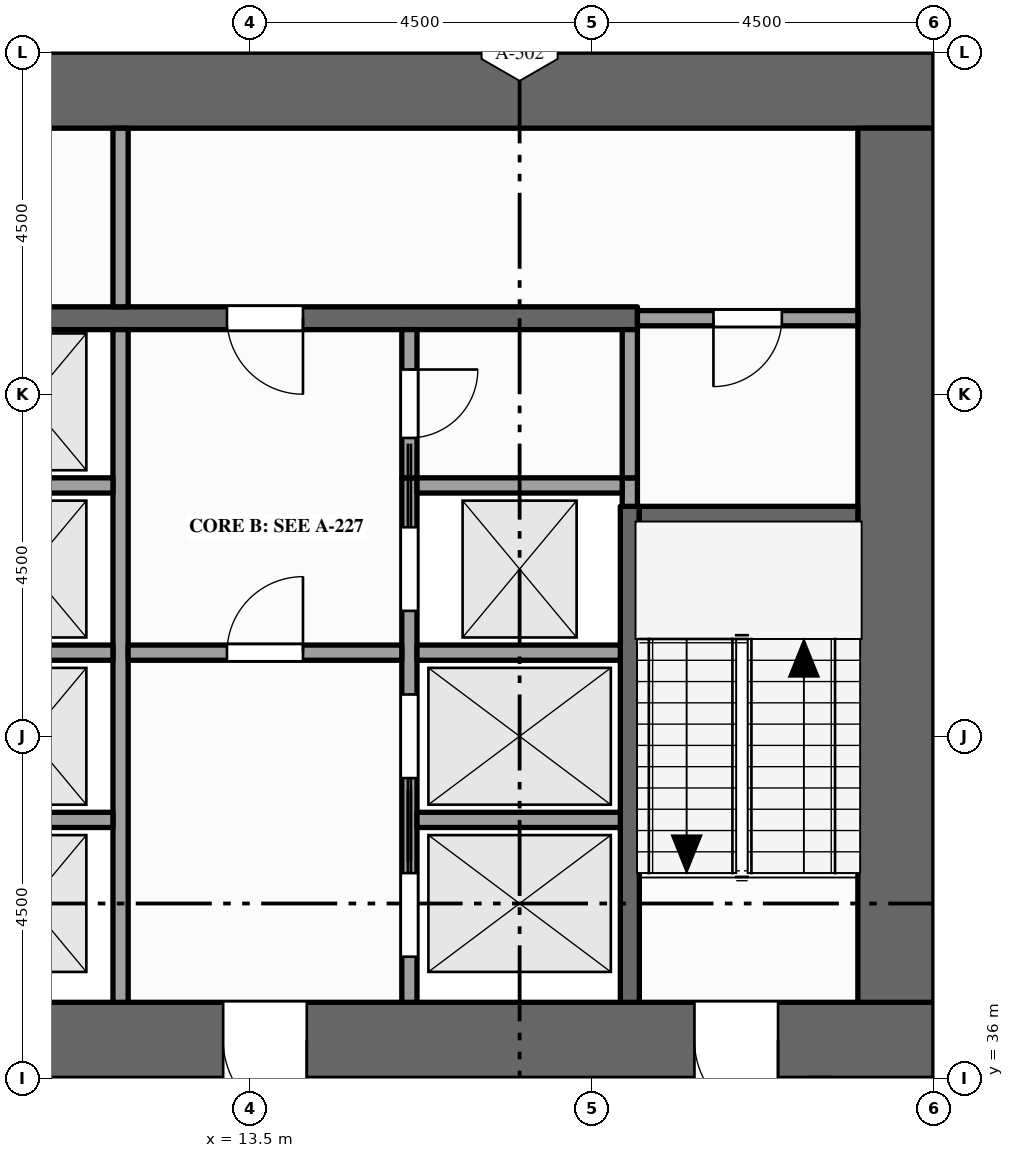
"""IFC4 building model, lengths in metres.
Left out: names, types, materials, properties, quantities, classifications, styles, units other than length and angle.
Written with IfcOpenShell. Run it as: python <this file> out.ifc"""

import sys

from ifc_helpers import new_model, si_unit, direction, frame, frame_2d, origin, place, context, subcontext, project, spatial, rectangle, extrude, element, fill, save


model = new_model("IFC4")
c1 = context("Model", 3, precision=1e-05, world=origin(), true_north=direction((0.0, 1.0)))
c2 = subcontext(c1, "Body", "Model", "MODEL_VIEW")
j1 = project(units=[si_unit("LENGTHUNIT", "METRE"), si_unit("PLANEANGLEUNIT", "RADIAN")], contexts=[c1])
p1 = place(None, origin())
s1 = spatial("IfcSite", under=j1, at=p1, CompositionType="ELEMENT")
p2 = place(p1, origin())
s2 = spatial("IfcBuilding", under=s1, at=p2, CompositionType="ELEMENT")
p3 = place(p2, frame((0.0, 0.0, 147.0)))
s3 = spatial("IfcBuildingStorey", under=s2, at=p3, CompositionType="ELEMENT", Elevation=147.0)
p4 = place(p3, frame((0.0, 36.5, -0.15), z_axis=(0.0, 0.0, 1.0), x_axis=(1.0, 0.0, 0.0)))
e1 = element("IfcWall", 1, at=p4, inside=s3, PredefinedType="SHEAR", context=c2, shape_type="SweptSolid", body=[
    extrude(rectangle(XDim=22.5, YDim=1.0, at=frame_2d((11.25, 0.0))), origin(), (0.0, 0.0, 1.0), 4.0),
])
p5 = place(p4, frame((7.1, 0.0, 0.15)))
e2 = element("IfcOpeningElement", 2, at=p5, cuts=e1, PredefinedType="OPENING", context=c2, shape_type="SweptSolid", body=[
    extrude(rectangle(XDim=1.8, YDim=2.1, at=frame_2d((0.9, 1.05))), frame((0.0, 0.51, 0.0), z_axis=(0.0, -1.0, 0.0), x_axis=(1.0, 0.0, 0.0)), (0.0, 0.0, 1.0), 1.02),
])
p6 = place(p4, frame((13.15, 0.0, 0.15)))
e3 = element("IfcOpeningElement", 3, at=p6, cuts=e1, PredefinedType="OPENING", context=c2, shape_type="SweptSolid", body=[
    extrude(rectangle(XDim=1.1, YDim=2.1, at=frame_2d((0.55, 1.05))), frame((0.0, 0.51, 0.0), z_axis=(0.0, -1.0, 0.0), x_axis=(1.0, 0.0, 0.0)), (0.0, 0.0, 1.0), 1.02),
])
p7 = place(p4, frame((2.15, 0.0, 0.15)))
e4 = element("IfcOpeningElement", 4, at=p7, cuts=e1, PredefinedType="OPENING", context=c2, shape_type="SweptSolid", body=[
    extrude(rectangle(XDim=1.1, YDim=2.1, at=frame_2d((0.55, 1.05))), frame((0.0, 0.51, 0.0), z_axis=(0.0, -1.0, 0.0), x_axis=(1.0, 0.0, 0.0)), (0.0, 0.0, 1.0), 1.02),
])
p8 = place(p4, frame((19.35, 0.0, 0.15)))
e5 = element("IfcOpeningElement", 5, at=p8, cuts=e1, PredefinedType="OPENING", context=c2, shape_type="SweptSolid", body=[
    extrude(rectangle(XDim=1.1, YDim=2.1, at=frame_2d((0.55, 1.05))), frame((0.0, 0.51, 0.0), z_axis=(0.0, -1.0, 0.0), x_axis=(1.0, 0.0, 0.0)), (0.0, 0.0, 1.0), 1.02),
])
p9 = place(p3, frame((0.0, 49.0, -0.15), z_axis=(0.0, 0.0, 1.0), x_axis=(1.0, 0.0, 0.0)))
e6 = element("IfcWall", 6, at=p9, inside=s3, PredefinedType="SHEAR", context=c2, shape_type="SweptSolid", body=[
    extrude(rectangle(XDim=22.5, YDim=1.0, at=frame_2d((11.25, 0.0))), origin(), (0.0, 0.0, 1.0), 4.0),
])
p10 = place(p3, frame((22.0, 37.0, -0.15), z_axis=(0.0, 0.0, 1.0), x_axis=(0.0, 1.0, 0.0)))
e7 = element("IfcWall", 7, at=p10, inside=s3, PredefinedType="SHEAR", context=c2, shape_type="SweptSolid", body=[
    extrude(rectangle(XDim=11.5, YDim=1.0, at=frame_2d((5.75, 0.0))), origin(), (0.0, 0.0, 1.0), 4.0),
])
p11 = place(p3, frame((11.8, 37.0, 0.0), z_axis=(0.0, 0.0, 1.0), x_axis=(0.0, 1.0, 0.0)))
e8 = element("IfcWall", 8, at=p11, inside=s3, PredefinedType="SOLIDWALL", context=c2, shape_type="SweptSolid", body=[
    extrude(rectangle(XDim=8.85, YDim=0.2, at=frame_2d((4.425, 0.0))), origin(), (0.0, 0.0, 1.0), 3.85),
])
p12 = place(p3, frame((11.8, 46.15, 0.0), z_axis=(0.0, 0.0, 1.0), x_axis=(0.0, 1.0, 0.0)))
e9 = element("IfcWall", 9, at=p12, inside=s3, PredefinedType="PARTITIONING", context=c2, shape_type="SweptSolid", body=[
    extrude(rectangle(XDim=2.35, YDim=0.2, at=frame_2d((1.175, 0.0))), origin(), (0.0, 0.0, 1.0), 3.85),
])
p13 = place(p3, frame((15.6, 37.0, 0.0), z_axis=(0.0, 0.0, 1.0), x_axis=(0.0, 1.0, 0.0)))
e10 = element("IfcWall", 10, at=p13, inside=s3, PredefinedType="SOLIDWALL", context=c2, shape_type="SweptSolid", body=[
    extrude(rectangle(XDim=6.9, YDim=0.2, at=frame_2d((3.45, 0.0))), origin(), (0.0, 0.0, 1.0), 3.85),
])
p14 = place(p13, frame((0.6, 0.0, 0.012)))
e11 = element("IfcOpeningElement", 11, at=p14, cuts=e10, PredefinedType="OPENING", context=c2, shape_type="SweptSolid", body=[
    extrude(rectangle(XDim=1.1, YDim=2.1, at=frame_2d((0.55, 1.05))), frame((0.0, 0.11, 0.0), z_axis=(0.0, -1.0, 0.0), x_axis=(1.0, 0.0, 0.0)), (0.0, 0.0, 1.0), 0.22),
])
p15 = place(p13, frame((2.95, 0.0, 0.012)))
e12 = element("IfcOpeningElement", 12, at=p15, cuts=e10, PredefinedType="OPENING", context=c2, shape_type="SweptSolid", body=[
    extrude(rectangle(XDim=1.1, YDim=2.1, at=frame_2d((0.55, 1.05))), frame((0.0, 0.11, 0.0), z_axis=(0.0, -1.0, 0.0), x_axis=(1.0, 0.0, 0.0)), (0.0, 0.0, 1.0), 0.22),
])
p16 = place(p13, frame((5.15, 0.0, 0.012)))
e13 = element("IfcOpeningElement", 13, at=p16, cuts=e10, PredefinedType="OPENING", context=c2, shape_type="SweptSolid", body=[
    extrude(rectangle(XDim=1.1, YDim=2.1, at=frame_2d((0.55, 1.05))), frame((0.0, 0.11, 0.0), z_axis=(0.0, -1.0, 0.0), x_axis=(1.0, 0.0, 0.0)), (0.0, 0.0, 1.0), 0.22),
])
p17 = place(p3, frame((15.6, 43.9, 0.0), z_axis=(0.0, 0.0, 1.0), x_axis=(0.0, 1.0, 0.0)))
e14 = element("IfcWall", 14, at=p17, inside=s3, PredefinedType="PARTITIONING", context=c2, shape_type="SweptSolid", body=[
    extrude(rectangle(XDim=1.95, YDim=0.2, at=frame_2d((0.975, 0.0))), origin(), (0.0, 0.0, 1.0), 3.85),
])
p18 = place(p17, frame((0.525, 0.0, 0.0)))
e15 = element("IfcOpeningElement", 15, at=p18, cuts=e14, PredefinedType="OPENING", context=c2, shape_type="SweptSolid", body=[
    extrude(rectangle(XDim=0.9, YDim=2.1, at=frame_2d((0.45, 1.05))), frame((0.0, 0.11, 0.0), z_axis=(0.0, -1.0, 0.0), x_axis=(1.0, 0.0, 0.0)), (0.0, 0.0, 1.0), 0.22),
])
p19 = place(p3, frame((18.5, 37.0, 0.0), z_axis=(0.0, 0.0, 1.0), x_axis=(0.0, 1.0, 0.0)))
e16 = element("IfcWall", 16, at=p19, inside=s3, PredefinedType="SHEAR", context=c2, shape_type="SweptSolid", body=[
    extrude(rectangle(XDim=6.525, YDim=0.25, at=frame_2d((3.262, 0.0))), origin(), (0.0, 0.0, 1.0), 3.85),
])
p20 = place(p3, frame((18.5, 43.525, 0.0), z_axis=(0.0, 0.0, 1.0), x_axis=(0.0, 1.0, 0.0)))
e17 = element("IfcWall", 17, at=p20, inside=s3, PredefinedType="SOLIDWALL", context=c2, shape_type="SweptSolid", body=[
    extrude(rectangle(XDim=0.375, YDim=0.2, at=frame_2d((0.188, 0.0))), origin(), (0.0, 0.0, 1.0), 3.85),
])
p21 = place(p3, frame((18.5, 43.9, 0.0), z_axis=(0.0, 0.0, 1.0), x_axis=(0.0, 1.0, 0.0)))
e18 = element("IfcWall", 18, at=p21, inside=s3, PredefinedType="PARTITIONING", context=c2, shape_type="SweptSolid", body=[
    extrude(rectangle(XDim=1.95, YDim=0.2, at=frame_2d((0.975, 0.0))), origin(), (0.0, 0.0, 1.0), 3.85),
])
p22 = place(p3, frame((9.5, 39.4, 0.0), z_axis=(0.0, 0.0, 1.0), x_axis=(1.0, 0.0, 0.0)))
e19 = element("IfcWall", 19, at=p22, inside=s3, PredefinedType="SOLIDWALL", context=c2, shape_type="SweptSolid", body=[
    extrude(rectangle(XDim=2.2, YDim=0.2, at=frame_2d((1.1, 0.0))), origin(), (0.0, 0.0, 1.0), 3.85),
])
p23 = place(p3, frame((15.7, 39.4, 0.0), z_axis=(0.0, 0.0, 1.0), x_axis=(1.0, 0.0, 0.0)))
e20 = element("IfcWall", 20, at=p23, inside=s3, PredefinedType="SOLIDWALL", context=c2, shape_type="SweptSolid", body=[
    extrude(rectangle(XDim=2.675, YDim=0.2, at=frame_2d((1.337, 0.0))), origin(), (0.0, 0.0, 1.0), 3.85),
])
p24 = place(p3, frame((9.5, 41.6, 0.0), z_axis=(0.0, 0.0, 1.0), x_axis=(1.0, 0.0, 0.0)))
e21 = element("IfcWall", 21, at=p24, inside=s3, PredefinedType="SOLIDWALL", context=c2, shape_type="SweptSolid", body=[
    extrude(rectangle(XDim=2.2, YDim=0.2, at=frame_2d((1.1, 0.0))), origin(), (0.0, 0.0, 1.0), 3.85),
])
p25 = place(p3, frame((11.9, 41.6, 0.0), z_axis=(0.0, 0.0, 1.0), x_axis=(1.0, 0.0, 0.0)))
e22 = element("IfcWall", 22, at=p25, inside=s3, PredefinedType="PARTITIONING", context=c2, shape_type="SweptSolid", body=[
    extrude(rectangle(XDim=3.6, YDim=0.2, at=frame_2d((1.8, 0.0))), origin(), (0.0, 0.0, 1.0), 3.85),
])
p26 = place(p25, frame((1.3, 0.0, 0.0)))
e23 = element("IfcOpeningElement", 23, at=p26, cuts=e22, PredefinedType="OPENING", context=c2, shape_type="SweptSolid", body=[
    extrude(rectangle(XDim=1.0, YDim=2.1, at=frame_2d((0.5, 1.05))), frame((0.0, 0.11, 0.0), z_axis=(0.0, -1.0, 0.0), x_axis=(1.0, 0.0, 0.0)), (0.0, 0.0, 1.0), 0.22),
])
p27 = place(p3, frame((15.7, 41.6, 0.0), z_axis=(0.0, 0.0, 1.0), x_axis=(1.0, 0.0, 0.0)))
e24 = element("IfcWall", 24, at=p27, inside=s3, PredefinedType="SOLIDWALL", context=c2, shape_type="SweptSolid", body=[
    extrude(rectangle(XDim=2.675, YDim=0.2, at=frame_2d((1.337, 0.0))), origin(), (0.0, 0.0, 1.0), 3.85),
])
p28 = place(p3, frame((18.625, 43.4, 0.0), z_axis=(0.0, 0.0, 1.0), x_axis=(1.0, 0.0, 0.0)))
e25 = element("IfcWall", 25, at=p28, inside=s3, PredefinedType="SHEAR", context=c2, shape_type="SweptSolid", body=[
    extrude(rectangle(XDim=2.875, YDim=0.25, at=frame_2d((1.438, 0.0))), origin(), (0.0, 0.0, 1.0), 3.85),
])
p29 = place(p3, frame((9.5, 43.8, 0.0), z_axis=(0.0, 0.0, 1.0), x_axis=(1.0, 0.0, 0.0)))
e26 = element("IfcWall", 26, at=p29, inside=s3, PredefinedType="SOLIDWALL", context=c2, shape_type="SweptSolid", body=[
    extrude(rectangle(XDim=2.2, YDim=0.2, at=frame_2d((1.1, 0.0))), origin(), (0.0, 0.0, 1.0), 3.85),
])
p30 = place(p3, frame((15.7, 43.8, 0.0), z_axis=(0.0, 0.0, 1.0), x_axis=(1.0, 0.0, 0.0)))
e27 = element("IfcWall", 27, at=p30, inside=s3, PredefinedType="SOLIDWALL", context=c2, shape_type="SweptSolid", body=[
    extrude(rectangle(XDim=2.7, YDim=0.2, at=frame_2d((1.35, 0.0))), origin(), (0.0, 0.0, 1.0), 3.85),
])
p31 = place(p3, frame((4.1, 46.0, 0.0), z_axis=(0.0, 0.0, 1.0), x_axis=(1.0, 0.0, 0.0)))
e28 = element("IfcWall", 28, at=p31, inside=s3, PredefinedType="SHEAR", context=c2, shape_type="SweptSolid", body=[
    extrude(rectangle(XDim=14.5, YDim=0.3, at=frame_2d((7.25, 0.0))), origin(), (0.0, 0.0, 1.0), 3.85),
])
p32 = place(p31, frame((3.4, 0.0, 0.0)))
e29 = element("IfcOpeningElement", 29, at=p32, cuts=e28, PredefinedType="OPENING", context=c2, shape_type="SweptSolid", body=[
    extrude(rectangle(XDim=1.0, YDim=2.1, at=frame_2d((0.5, 1.05))), frame((0.0, 0.16, 0.0), z_axis=(0.0, -1.0, 0.0), x_axis=(1.0, 0.0, 0.0)), (0.0, 0.0, 1.0), 0.32),
])
p33 = place(p31, frame((9.1, 0.0, 0.0)))
e30 = element("IfcOpeningElement", 30, at=p33, cuts=e28, PredefinedType="OPENING", context=c2, shape_type="SweptSolid", body=[
    extrude(rectangle(XDim=1.0, YDim=2.1, at=frame_2d((0.5, 1.05))), frame((0.0, 0.16, 0.0), z_axis=(0.0, -1.0, 0.0), x_axis=(1.0, 0.0, 0.0)), (0.0, 0.0, 1.0), 0.32),
])
p34 = place(p3, frame((18.6, 46.0, 0.0), z_axis=(0.0, 0.0, 1.0), x_axis=(1.0, 0.0, 0.0)))
e31 = element("IfcWall", 31, at=p34, inside=s3, PredefinedType="PARTITIONING", context=c2, shape_type="SweptSolid", body=[
    extrude(rectangle(XDim=2.9, YDim=0.2, at=frame_2d((1.45, 0.0))), origin(), (0.0, 0.0, 1.0), 3.85),
])
p35 = place(p34, frame((1.0, 0.0, 0.0)))
e32 = element("IfcOpeningElement", 32, at=p35, cuts=e31, PredefinedType="OPENING", context=c2, shape_type="SweptSolid", body=[
    extrude(rectangle(XDim=0.9, YDim=2.1, at=frame_2d((0.45, 1.05))), frame((0.0, 0.11, 0.0), z_axis=(0.0, -1.0, 0.0), x_axis=(1.0, 0.0, 0.0)), (0.0, 0.0, 1.0), 0.22),
])
p36 = place(p14, origin())
e33 = element("IfcDoor", 33, at=p36, inside=s3, OperationType="SLIDING_TO_RIGHT", PredefinedType="DOOR", context=c2, shape_type="SweptSolid", body=[
    extrude(rectangle(XDim=1.1, YDim=2.1, at=frame_2d((0.55, 1.05))), frame((0.0, 0.025, 0.0), z_axis=(0.0, -1.0, 0.0), x_axis=(1.0, 0.0, 0.0)), (0.0, 0.0, 1.0), 0.05),
])
fill(e11, e33)
p37 = place(p15, origin())
e34 = element("IfcDoor", 34, at=p37, inside=s3, OperationType="SLIDING_TO_LEFT", PredefinedType="DOOR", context=c2, shape_type="SweptSolid", body=[
    extrude(rectangle(XDim=1.1, YDim=2.1, at=frame_2d((0.55, 1.05))), frame((0.0, 0.025, 0.0), z_axis=(0.0, -1.0, 0.0), x_axis=(1.0, 0.0, 0.0)), (0.0, 0.0, 1.0), 0.05),
])
fill(e12, e34)
p38 = place(p16, origin())
e35 = element("IfcDoor", 35, at=p38, inside=s3, OperationType="SLIDING_TO_RIGHT", PredefinedType="DOOR", context=c2, shape_type="SweptSolid", body=[
    extrude(rectangle(XDim=1.1, YDim=2.1, at=frame_2d((0.55, 1.05))), frame((0.0, 0.025, 0.0), z_axis=(0.0, -1.0, 0.0), x_axis=(1.0, 0.0, 0.0)), (0.0, 0.0, 1.0), 0.05),
])
fill(e13, e35)
p39 = place(p6, origin())
e36 = element("IfcDoor", 36, at=p39, inside=s3, OperationType="SINGLE_SWING_RIGHT", PredefinedType="DOOR", context=c2, shape_type="SweptSolid", body=[
    extrude(rectangle(XDim=1.1, YDim=2.1, at=frame_2d((0.55, 1.05))), frame((0.0, 0.025, 0.0), z_axis=(0.0, -1.0, 0.0), x_axis=(1.0, 0.0, 0.0)), (0.0, 0.0, 1.0), 0.05),
])
fill(e3, e36)
p40 = place(p26, origin())
e37 = element("IfcDoor", 37, at=p40, inside=s3, OperationType="SINGLE_SWING_RIGHT", PredefinedType="DOOR", context=c2, shape_type="SweptSolid", body=[
    extrude(rectangle(XDim=1.0, YDim=2.1, at=frame_2d((0.5, 1.05))), frame((0.0, 0.025, 0.0), z_axis=(0.0, -1.0, 0.0), x_axis=(1.0, 0.0, 0.0)), (0.0, 0.0, 1.0), 0.05),
])
fill(e23, e37)
p41 = place(p33, origin())
e38 = element("IfcDoor", 38, at=p41, inside=s3, OperationType="SINGLE_SWING_RIGHT", PredefinedType="DOOR", context=c2, shape_type="SweptSolid", body=[
    extrude(rectangle(XDim=1.0, YDim=2.1, at=frame_2d((0.5, 1.05))), frame((0.0, 0.025, 0.0), z_axis=(0.0, -1.0, 0.0), x_axis=(1.0, 0.0, 0.0)), (0.0, 0.0, 1.0), 0.05),
])
fill(e30, e38)
p42 = place(p8, origin())
e39 = element("IfcDoor", 39, at=p42, inside=s3, OperationType="SINGLE_SWING_RIGHT", PredefinedType="DOOR", context=c2, shape_type="SweptSolid", body=[
    extrude(rectangle(XDim=1.1, YDim=2.1, at=frame_2d((0.55, 1.05))), frame((0.0, 0.025, 0.0), z_axis=(0.0, -1.0, 0.0), x_axis=(1.0, 0.0, 0.0)), (0.0, 0.0, 1.0), 0.05),
])
fill(e5, e39)
p43 = place(p35, origin())
e40 = element("IfcDoor", 40, at=p43, inside=s3, OperationType="SINGLE_SWING_LEFT", PredefinedType="DOOR", context=c2, shape_type="SweptSolid", body=[
    extrude(rectangle(XDim=0.9, YDim=2.1, at=frame_2d((0.45, 1.05))), frame((0.0, 0.025, 0.0), z_axis=(0.0, -1.0, 0.0), x_axis=(1.0, 0.0, 0.0)), (0.0, 0.0, 1.0), 0.05),
])
fill(e32, e40)
p44 = place(p18, origin())
e41 = element("IfcDoor", 41, at=p44, inside=s3, OperationType="SINGLE_SWING_RIGHT", PredefinedType="DOOR", context=c2, shape_type="SweptSolid", body=[
    extrude(rectangle(XDim=0.9, YDim=2.1, at=frame_2d((0.45, 1.05))), frame((0.0, 0.025, 0.0), z_axis=(0.0, -1.0, 0.0), x_axis=(1.0, 0.0, 0.0)), (0.0, 0.0, 1.0), 0.05),
])
fill(e15, e41)
save(model, sys.argv[1])
